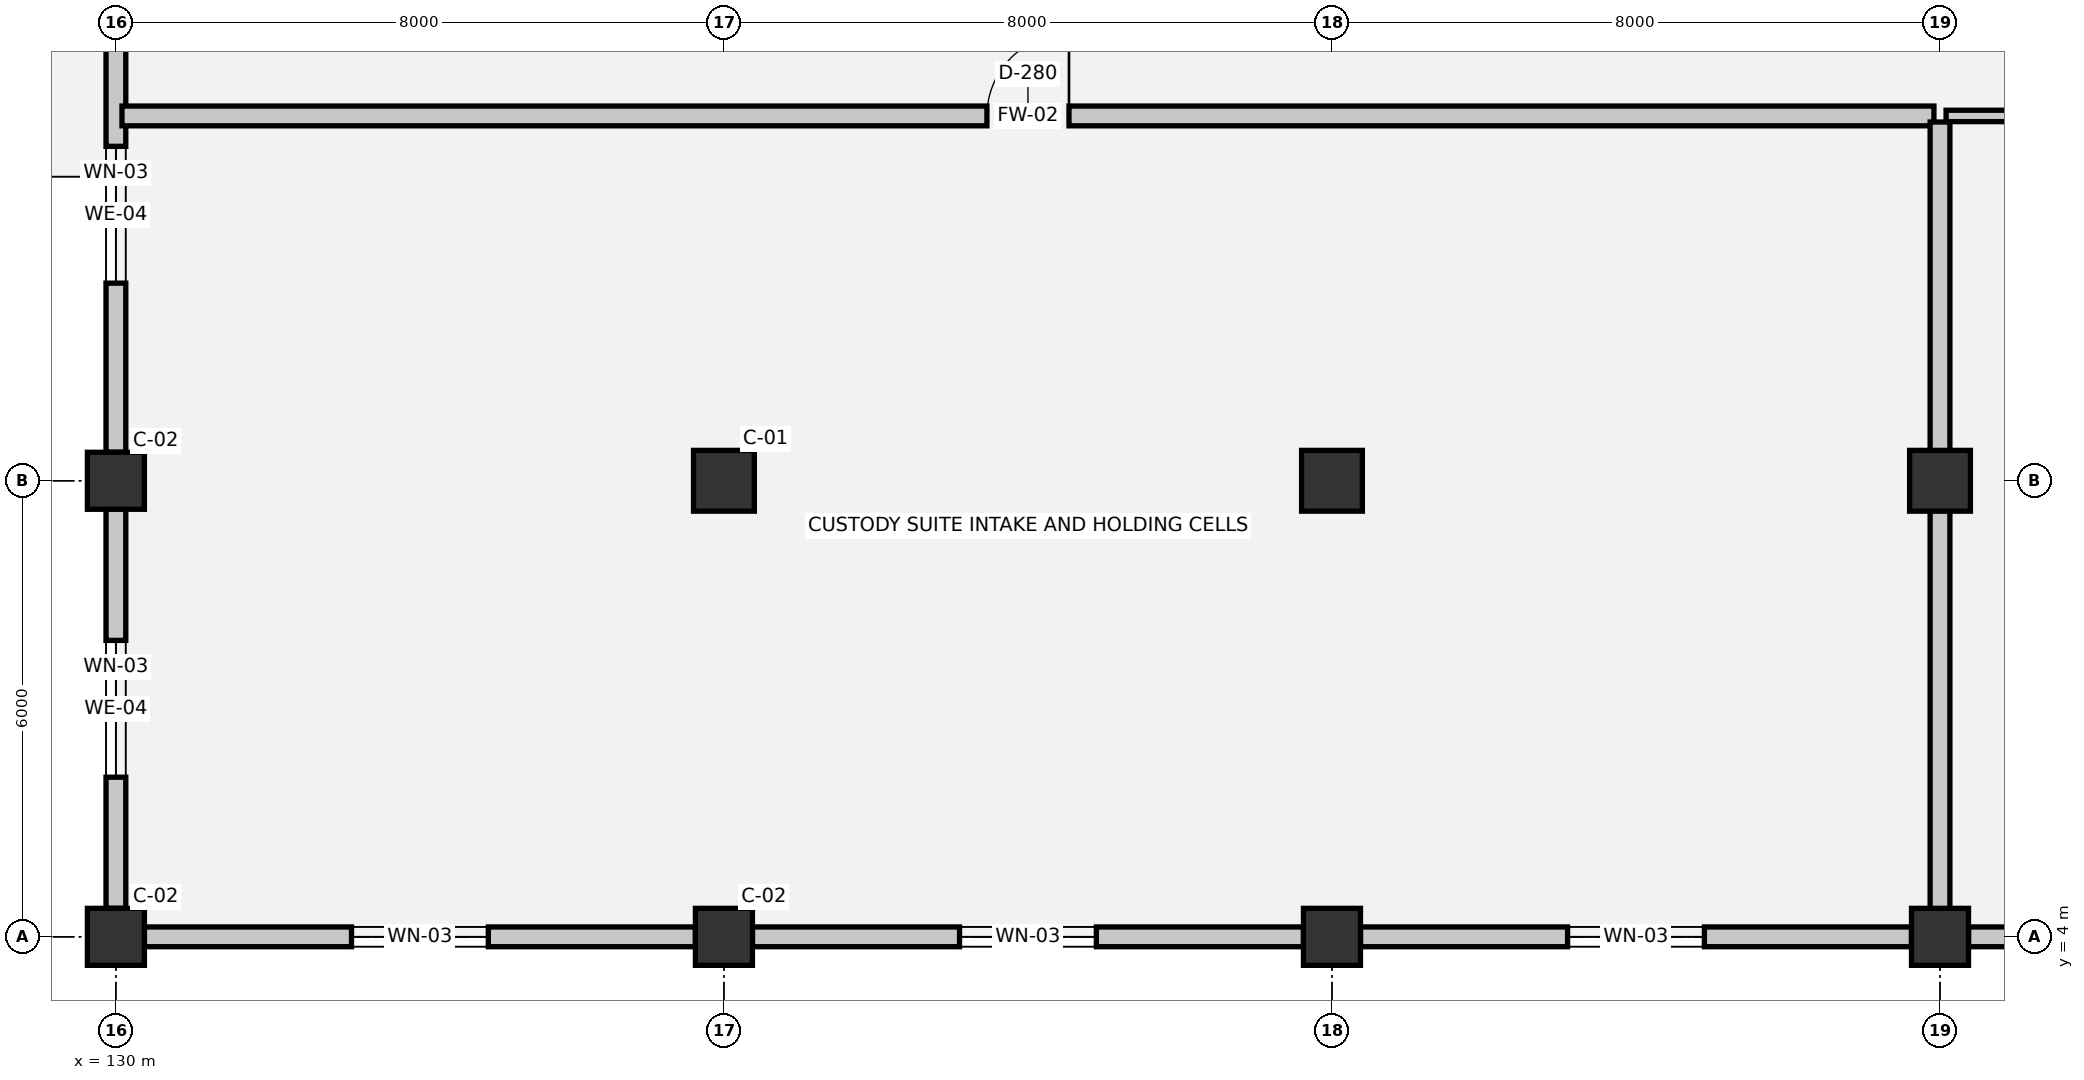
"""IFC4 building model, lengths in metres.
Left out: names, types, materials, properties, quantities, classifications, styles, units other than length and angle.
Written with IfcOpenShell. Run it as: python <this file> out.ifc"""

import sys

from ifc_helpers import new_model, si_unit, direction, frame, frame_2d, origin, origin_2d, place, context, subcontext, project, spatial, rectangle, extrude, element, fill, save


model = new_model("IFC4")
c1 = context("Model", 3, precision=1e-05, world=origin(), true_north=direction((0.0, 1.0)))
c2 = subcontext(c1, "Body", "Model", "MODEL_VIEW")
j1 = project(units=[si_unit("LENGTHUNIT", "METRE"), si_unit("PLANEANGLEUNIT", "RADIAN")], contexts=[c1])
p1 = place(None, origin())
s1 = spatial("IfcSite", under=j1, at=p1, CompositionType="ELEMENT")
p2 = place(p1, origin())
s2 = spatial("IfcBuilding", under=s1, at=p2, CompositionType="ELEMENT")
p3 = place(p2, origin())
s3 = spatial("IfcBuildingStorey", under=s2, at=p3, CompositionType="ELEMENT", Elevation=0.0)
for number, where, z_axis, x_axis in (
    (1, (130.0, 4.0, 0.0), (0.0, 0.0, 1.0), (1.0, 0.0, 0.0)),
    (2, (130.0, 10.0, 0.0), (0.0, 0.0, 1.0), (1.0, 0.0, 0.0)),
    (3, (138.0, 4.0, 0.0), (0.0, 0.0, 1.0), (1.0, 0.0, 0.0)),
):
    element("IfcColumn", number, at=place(p3, frame(where, z_axis=z_axis, x_axis=x_axis)), inside=s3, PredefinedType="COLUMN", context=c2, shape_type="SweptSolid", body=[
        extrude(rectangle(XDim=0.75, YDim=0.75, at=origin_2d()), origin(), (0.0, 0.0, 1.0), 5.4),
    ])
p4 = place(p3, frame((138.0, 10.0, 0.0), z_axis=(0.0, 0.0, 1.0), x_axis=(1.0, 0.0, 0.0)))
e4 = element("IfcColumn", 4, at=p4, inside=s3, PredefinedType="COLUMN", context=c2, shape_type="SweptSolid", body=[
    extrude(rectangle(XDim=0.8, YDim=0.8, at=origin_2d()), origin(), (0.0, 0.0, 1.0), 5.4),
])
p5 = place(p3, frame((146.0, 4.0, 0.0), z_axis=(0.0, 0.0, 1.0), x_axis=(1.0, 0.0, 0.0)))
e5 = element("IfcColumn", 5, at=p5, inside=s3, PredefinedType="COLUMN", context=c2, shape_type="SweptSolid", body=[
    extrude(rectangle(XDim=0.75, YDim=0.75, at=origin_2d()), origin(), (0.0, 0.0, 1.0), 5.4),
])
p6 = place(p3, frame((146.0, 10.0, 0.0), z_axis=(0.0, 0.0, 1.0), x_axis=(1.0, 0.0, 0.0)))
e6 = element("IfcColumn", 6, at=p6, inside=s3, PredefinedType="COLUMN", context=c2, shape_type="SweptSolid", body=[
    extrude(rectangle(XDim=0.8, YDim=0.8, at=origin_2d()), origin(), (0.0, 0.0, 1.0), 5.4),
])
p7 = place(p3, frame((154.0, 4.0, 0.0), z_axis=(0.0, 0.0, 1.0), x_axis=(1.0, 0.0, 0.0)))
e7 = element("IfcColumn", 7, at=p7, inside=s3, PredefinedType="COLUMN", context=c2, shape_type="SweptSolid", body=[
    extrude(rectangle(XDim=0.75, YDim=0.75, at=origin_2d()), origin(), (0.0, 0.0, 1.0), 5.4),
])
p8 = place(p3, frame((154.0, 10.0, 0.0), z_axis=(0.0, 0.0, 1.0), x_axis=(1.0, 0.0, 0.0)))
e8 = element("IfcColumn", 8, at=p8, inside=s3, PredefinedType="COLUMN", context=c2, shape_type="SweptSolid", body=[
    extrude(rectangle(XDim=0.8, YDim=0.8, at=origin_2d()), origin(), (0.0, 0.0, 1.0), 5.4),
])
p9 = place(p3, frame((130.0, 4.375, 0.0), z_axis=(0.0, 0.0, 1.0), x_axis=(0.0, 1.0, 0.0)))
e9 = element("IfcWall", 9, at=p9, inside=s3, PredefinedType="SOLIDWALL", context=c2, shape_type="SweptSolid", body=[
    extrude(rectangle(XDim=5.25, YDim=0.26, at=frame_2d((2.625, 0.0))), origin(), (0.0, 0.0, 1.0), 4.13),
])
p10 = place(p9, frame((1.725, 0.0, 0.9)))
e10 = element("IfcOpeningElement", 10, at=p10, cuts=e9, PredefinedType="OPENING", context=c2, shape_type="SweptSolid", body=[
    extrude(rectangle(XDim=1.8, YDim=2.0, at=frame_2d((0.9, 1.0))), frame((0.0, 0.14, 0.0), z_axis=(0.0, -1.0, 0.0), x_axis=(1.0, 0.0, 0.0)), (0.0, 0.0, 1.0), 0.28),
])
p11 = place(p3, frame((130.0, 10.375, 0.0), z_axis=(0.0, 0.0, 1.0), x_axis=(0.0, 1.0, 0.0)))
e11 = element("IfcWall", 11, at=p11, inside=s3, PredefinedType="SOLIDWALL", context=c2, shape_type="SweptSolid", body=[
    extrude(rectangle(XDim=6.25, YDim=0.26, at=frame_2d((3.125, 0.0))), origin(), (0.0, 0.0, 1.0), 4.13),
])
p12 = place(p11, frame((2.225, 0.0, 0.9)))
e12 = element("IfcOpeningElement", 12, at=p12, cuts=e11, PredefinedType="OPENING", context=c2, shape_type="SweptSolid", body=[
    extrude(rectangle(XDim=1.8, YDim=2.0, at=frame_2d((0.9, 1.0))), frame((0.0, 0.14, 0.0), z_axis=(0.0, -1.0, 0.0), x_axis=(1.0, 0.0, 0.0)), (0.0, 0.0, 1.0), 0.28),
])
p13 = place(p3, frame((161.625, 4.0, 0.0), z_axis=(0.0, 0.0, 1.0), x_axis=(-1.0, 0.0, 0.0)))
e13 = element("IfcWall", 13, at=p13, inside=s3, PredefinedType="SOLIDWALL", context=c2, shape_type="SweptSolid", body=[
    extrude(rectangle(XDim=7.25, YDim=0.26, at=frame_2d((3.625, 0.0))), origin(), (0.0, 0.0, 1.0), 4.13),
])
p14 = place(p13, frame((2.725, 0.0, 0.9)))
e14 = element("IfcOpeningElement", 14, at=p14, cuts=e13, PredefinedType="OPENING", context=c2, shape_type="SweptSolid", body=[
    extrude(rectangle(XDim=1.8, YDim=2.0, at=frame_2d((0.9, 1.0))), frame((0.0, 0.14, 0.0), z_axis=(0.0, -1.0, 0.0), x_axis=(1.0, 0.0, 0.0)), (0.0, 0.0, 1.0), 0.28),
])
p15 = place(p3, frame((153.625, 4.0, 0.0), z_axis=(0.0, 0.0, 1.0), x_axis=(-1.0, 0.0, 0.0)))
e15 = element("IfcWall", 15, at=p15, inside=s3, PredefinedType="SOLIDWALL", context=c2, shape_type="SweptSolid", body=[
    extrude(rectangle(XDim=7.25, YDim=0.26, at=frame_2d((3.625, 0.0))), origin(), (0.0, 0.0, 1.0), 4.13),
])
p16 = place(p15, frame((2.725, 0.0, 0.9)))
e16 = element("IfcOpeningElement", 16, at=p16, cuts=e15, PredefinedType="OPENING", context=c2, shape_type="SweptSolid", body=[
    extrude(rectangle(XDim=1.8, YDim=2.0, at=frame_2d((0.9, 1.0))), frame((0.0, 0.14, 0.0), z_axis=(0.0, -1.0, 0.0), x_axis=(1.0, 0.0, 0.0)), (0.0, 0.0, 1.0), 0.28),
])
p17 = place(p3, frame((145.625, 4.0, 0.0), z_axis=(0.0, 0.0, 1.0), x_axis=(-1.0, 0.0, 0.0)))
e17 = element("IfcWall", 17, at=p17, inside=s3, PredefinedType="SOLIDWALL", context=c2, shape_type="SweptSolid", body=[
    extrude(rectangle(XDim=7.25, YDim=0.26, at=frame_2d((3.625, 0.0))), origin(), (0.0, 0.0, 1.0), 4.13),
])
p18 = place(p17, frame((2.725, 0.0, 0.9)))
e18 = element("IfcOpeningElement", 18, at=p18, cuts=e17, PredefinedType="OPENING", context=c2, shape_type="SweptSolid", body=[
    extrude(rectangle(XDim=1.8, YDim=2.0, at=frame_2d((0.9, 1.0))), frame((0.0, 0.14, 0.0), z_axis=(0.0, -1.0, 0.0), x_axis=(1.0, 0.0, 0.0)), (0.0, 0.0, 1.0), 0.28),
])
p19 = place(p3, frame((137.625, 4.0, 0.0), z_axis=(0.0, 0.0, 1.0), x_axis=(-1.0, 0.0, 0.0)))
e19 = element("IfcWall", 19, at=p19, inside=s3, PredefinedType="SOLIDWALL", context=c2, shape_type="SweptSolid", body=[
    extrude(rectangle(XDim=7.25, YDim=0.26, at=frame_2d((3.625, 0.0))), origin(), (0.0, 0.0, 1.0), 4.13),
])
p20 = place(p19, frame((2.725, 0.0, 0.9)))
e20 = element("IfcOpeningElement", 20, at=p20, cuts=e19, PredefinedType="OPENING", context=c2, shape_type="SweptSolid", body=[
    extrude(rectangle(XDim=1.8, YDim=2.0, at=frame_2d((0.9, 1.0))), frame((0.0, 0.14, 0.0), z_axis=(0.0, -1.0, 0.0), x_axis=(1.0, 0.0, 0.0)), (0.0, 0.0, 1.0), 0.28),
])
p21 = place(p3, frame((130.08, 14.8, 0.0), z_axis=(0.0, 0.0, 1.0), x_axis=(1.0, 0.0, 0.0)))
e21 = element("IfcWall", 21, at=p21, inside=s3, PredefinedType="SOLIDWALL", context=c2, shape_type="SweptSolid", body=[
    extrude(rectangle(XDim=23.84, YDim=0.26, at=frame_2d((11.92, 0.0))), origin(), (0.0, 0.0, 1.0), 5.04),
])
p22 = place(p21, frame((11.38, 0.0, 0.0)))
e22 = element("IfcOpeningElement", 22, at=p22, cuts=e21, PredefinedType="OPENING", context=c2, shape_type="SweptSolid", body=[
    extrude(rectangle(XDim=1.08, YDim=2.1, at=frame_2d((0.54, 1.05))), frame((0.0, 0.14, 0.0), z_axis=(0.0, -1.0, 0.0), x_axis=(1.0, 0.0, 0.0)), (0.0, 0.0, 1.0), 0.28),
])
p23 = place(p3, frame((154.08, 14.8, 0.0), z_axis=(0.0, 0.0, 1.0), x_axis=(1.0, 0.0, 0.0)))
e23 = element("IfcWall", 23, at=p23, inside=s3, PredefinedType="PARTITIONING", context=c2, shape_type="SweptSolid", body=[
    extrude(rectangle(XDim=15.84, YDim=0.15, at=frame_2d((7.92, 0.0))), origin(), (0.0, 0.0, 1.0), 5.04),
])
p24 = place(p23, frame((7.33, 0.0, 0.0)))
e24 = element("IfcOpeningElement", 24, at=p24, cuts=e23, PredefinedType="OPENING", context=c2, shape_type="SweptSolid", body=[
    extrude(rectangle(XDim=1.18, YDim=2.2, at=frame_2d((0.59, 1.1))), frame((0.0, 0.085, 0.0), z_axis=(0.0, -1.0, 0.0), x_axis=(1.0, 0.0, 0.0)), (0.0, 0.0, 1.0), 0.17),
])
p25 = place(p3, frame((154.0, 4.08, 0.0), z_axis=(0.0, 0.0, 1.0), x_axis=(0.0, 1.0, 0.0)))
e25 = element("IfcWall", 25, at=p25, inside=s3, PredefinedType="SOLIDWALL", context=c2, shape_type="SweptSolid", body=[
    extrude(rectangle(XDim=10.64, YDim=0.26, at=frame_2d((5.32, 0.0))), origin(), (0.0, 0.0, 1.0), 4.45),
])
p26 = place(p10, origin())
e26 = element("IfcWindow", 26, at=p26, inside=s3, PartitioningType="SINGLE_PANEL", PredefinedType="WINDOW", context=c2, shape_type="SweptSolid", body=[
    extrude(rectangle(XDim=1.8, YDim=2.0, at=frame_2d((0.9, 1.0))), frame((0.0, 0.03, 0.0), z_axis=(0.0, -1.0, 0.0), x_axis=(1.0, 0.0, 0.0)), (0.0, 0.0, 1.0), 0.06),
])
fill(e10, e26)
p27 = place(p12, origin())
e27 = element("IfcWindow", 27, at=p27, inside=s3, PartitioningType="SINGLE_PANEL", PredefinedType="WINDOW", context=c2, shape_type="SweptSolid", body=[
    extrude(rectangle(XDim=1.8, YDim=2.0, at=frame_2d((0.9, 1.0))), frame((0.0, 0.03, 0.0), z_axis=(0.0, -1.0, 0.0), x_axis=(1.0, 0.0, 0.0)), (0.0, 0.0, 1.0), 0.06),
])
fill(e12, e27)
p28 = place(p16, origin())
e28 = element("IfcWindow", 28, at=p28, inside=s3, PartitioningType="SINGLE_PANEL", PredefinedType="WINDOW", context=c2, shape_type="SweptSolid", body=[
    extrude(rectangle(XDim=1.8, YDim=2.0, at=frame_2d((0.9, 1.0))), frame((0.0, 0.03, 0.0), z_axis=(0.0, -1.0, 0.0), x_axis=(1.0, 0.0, 0.0)), (0.0, 0.0, 1.0), 0.06),
])
fill(e16, e28)
p29 = place(p18, origin())
e29 = element("IfcWindow", 29, at=p29, inside=s3, PartitioningType="SINGLE_PANEL", PredefinedType="WINDOW", context=c2, shape_type="SweptSolid", body=[
    extrude(rectangle(XDim=1.8, YDim=2.0, at=frame_2d((0.9, 1.0))), frame((0.0, 0.03, 0.0), z_axis=(0.0, -1.0, 0.0), x_axis=(1.0, 0.0, 0.0)), (0.0, 0.0, 1.0), 0.06),
])
fill(e18, e29)
p30 = place(p20, origin())
e30 = element("IfcWindow", 30, at=p30, inside=s3, PartitioningType="SINGLE_PANEL", PredefinedType="WINDOW", context=c2, shape_type="SweptSolid", body=[
    extrude(rectangle(XDim=1.8, YDim=2.0, at=frame_2d((0.9, 1.0))), frame((0.0, 0.03, 0.0), z_axis=(0.0, -1.0, 0.0), x_axis=(1.0, 0.0, 0.0)), (0.0, 0.0, 1.0), 0.06),
])
fill(e20, e30)
p31 = place(p22, origin())
e31 = element("IfcDoor", 31, at=p31, inside=s3, OperationType="SINGLE_SWING_RIGHT", PredefinedType="DOOR", context=c2, shape_type="SweptSolid", body=[
    extrude(rectangle(XDim=1.08, YDim=2.1, at=frame_2d((0.54, 1.05))), frame((0.0, 0.025, 0.0), z_axis=(0.0, -1.0, 0.0), x_axis=(1.0, 0.0, 0.0)), (0.0, 0.0, 1.0), 0.05),
])
fill(e22, e31)
save(model, sys.argv[1])
